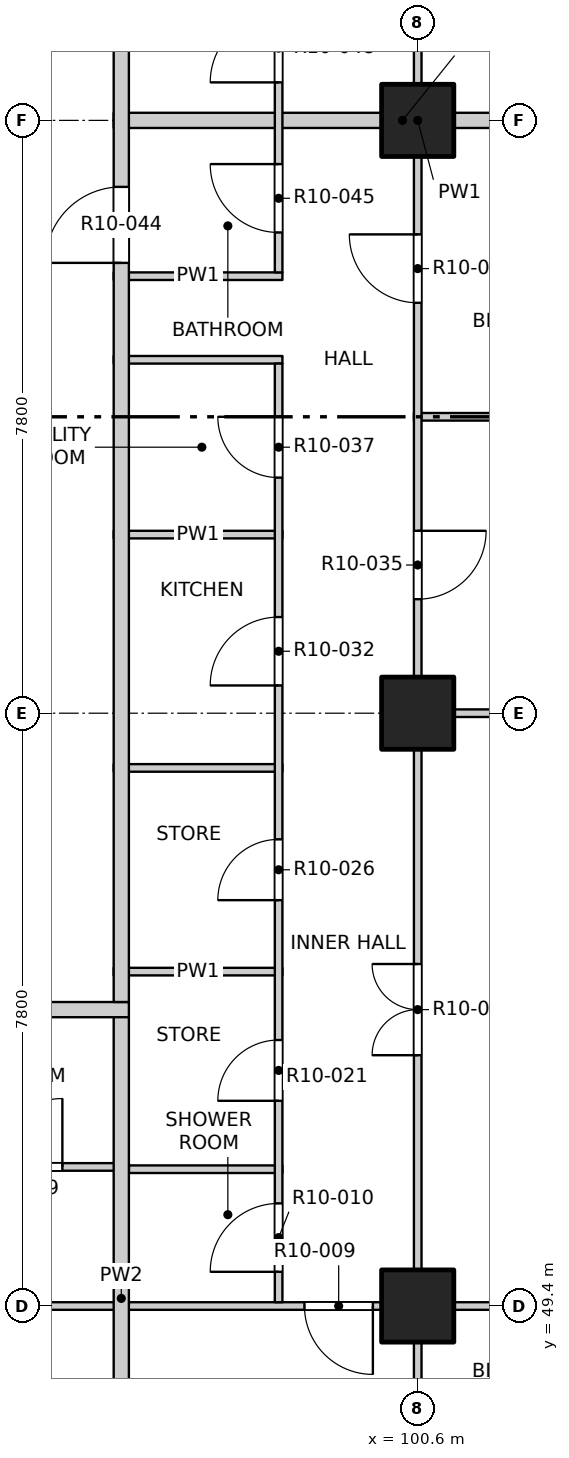
"""IFC4 building model, lengths in metres.
Left out: names, types, materials, properties, quantities, classifications, styles, units other than length and angle.
Written with IfcOpenShell. Run it as: python <this file> out.ifc"""

import sys

from ifc_helpers import new_model, si_unit, direction, frame, frame_2d, origin, origin_2d, place, context, subcontext, project, spatial, rectangle, extrude, element, fill, save


model = new_model("IFC4")
c1 = context("Model", 3, precision=1e-05, world=origin(), true_north=direction((0.0, 1.0)))
c2 = subcontext(c1, "Body", "Model", "MODEL_VIEW")
j1 = project(units=[si_unit("LENGTHUNIT", "METRE"), si_unit("PLANEANGLEUNIT", "RADIAN")], contexts=[c1])
p1 = place(None, origin())
s1 = spatial("IfcSite", under=j1, at=p1, CompositionType="ELEMENT")
p2 = place(p1, origin())
s2 = spatial("IfcBuilding", under=s1, at=p2, CompositionType="ELEMENT")
p3 = place(p2, frame((0.0, 0.0, 127.1)))
s3 = spatial("IfcBuildingStorey", under=s2, at=p3, CompositionType="ELEMENT", Elevation=127.1)
for number, where, z_axis, x_axis in (
    (1, (100.6, 49.4, -0.25), (0.0, 0.0, 1.0), (1.0, 0.0, 0.0)),
    (2, (100.6, 57.2, -0.25), (0.0, 0.0, 1.0), (1.0, 0.0, 0.0)),
    (3, (100.6, 65.0, -0.25), (0.0, 0.0, 1.0), (1.0, 0.0, 0.0)),
):
    element("IfcColumn", number, at=place(p3, frame(where, z_axis=z_axis, x_axis=x_axis)), inside=s3, PredefinedType="COLUMN", context=c2, shape_type="SweptSolid", body=[
        extrude(rectangle(XDim=0.95, YDim=0.95, at=origin_2d()), origin(), (0.0, 0.0, 1.0), 3.4),
    ])
p4 = place(p3, frame((65.8, 49.4, 0.0), z_axis=(0.0, 0.0, 1.0), x_axis=(1.0, 0.0, 0.0)))
e4 = element("IfcWall", 4, at=p4, inside=s3, PredefinedType="PARTITIONING", context=c2, shape_type="SweptSolid", body=[
    extrude(rectangle(XDim=38.4, YDim=0.1, at=frame_2d((19.2, 0.0))), origin(), (0.0, 0.0, 1.0), 3.15),
])
p5 = place(p4, frame((4.19, 0.0, 0.0)))
e5 = element("IfcOpeningElement", 5, at=p5, cuts=e4, PredefinedType="OPENING", context=c2, shape_type="SweptSolid", body=[
    extrude(rectangle(XDim=0.9, YDim=2.1, at=frame_2d((0.45, 1.05))), frame((0.0, 0.06, 0.0), z_axis=(0.0, -1.0, 0.0), x_axis=(1.0, 0.0, 0.0)), (0.0, 0.0, 1.0), 0.12),
])
p6 = place(p4, frame((9.0, 0.0, 0.0)))
e6 = element("IfcOpeningElement", 6, at=p6, cuts=e4, PredefinedType="OPENING", context=c2, shape_type="SweptSolid", body=[
    extrude(rectangle(XDim=0.9, YDim=2.1, at=frame_2d((0.45, 1.05))), frame((0.0, 0.06, 0.0), z_axis=(0.0, -1.0, 0.0), x_axis=(1.0, 0.0, 0.0)), (0.0, 0.0, 1.0), 0.12),
])
p7 = place(p4, frame((12.9, 0.0, 0.0)))
e7 = element("IfcOpeningElement", 7, at=p7, cuts=e4, PredefinedType="OPENING", context=c2, shape_type="SweptSolid", body=[
    extrude(rectangle(XDim=0.9, YDim=2.1, at=frame_2d((0.45, 1.05))), frame((0.0, 0.06, 0.0), z_axis=(0.0, -1.0, 0.0), x_axis=(1.0, 0.0, 0.0)), (0.0, 0.0, 1.0), 0.12),
])
p8 = place(p4, frame((16.8, 0.0, 0.0)))
e8 = element("IfcOpeningElement", 8, at=p8, cuts=e4, PredefinedType="OPENING", context=c2, shape_type="SweptSolid", body=[
    extrude(rectangle(XDim=0.9, YDim=2.1, at=frame_2d((0.45, 1.05))), frame((0.0, 0.06, 0.0), z_axis=(0.0, -1.0, 0.0), x_axis=(1.0, 0.0, 0.0)), (0.0, 0.0, 1.0), 0.12),
])
p9 = place(p4, frame((22.5, 0.0, 0.0)))
e9 = element("IfcOpeningElement", 9, at=p9, cuts=e4, PredefinedType="OPENING", context=c2, shape_type="SweptSolid", body=[
    extrude(rectangle(XDim=1.2, YDim=2.1, at=frame_2d((0.6, 1.05))), frame((0.0, 0.06, 0.0), z_axis=(0.0, -1.0, 0.0), x_axis=(1.0, 0.0, 0.0)), (0.0, 0.0, 1.0), 0.12),
])
p10 = place(p4, frame((28.5, 0.0, 0.0)))
e10 = element("IfcOpeningElement", 10, at=p10, cuts=e4, PredefinedType="OPENING", context=c2, shape_type="SweptSolid", body=[
    extrude(rectangle(XDim=0.9, YDim=2.1, at=frame_2d((0.45, 1.05))), frame((0.0, 0.06, 0.0), z_axis=(0.0, -1.0, 0.0), x_axis=(1.0, 0.0, 0.0)), (0.0, 0.0, 1.0), 0.12),
])
p11 = place(p4, frame((33.31, 0.0, 0.0)))
e11 = element("IfcOpeningElement", 11, at=p11, cuts=e4, PredefinedType="OPENING", context=c2, shape_type="SweptSolid", body=[
    extrude(rectangle(XDim=0.9, YDim=2.1, at=frame_2d((0.45, 1.05))), frame((0.0, 0.06, 0.0), z_axis=(0.0, -1.0, 0.0), x_axis=(1.0, 0.0, 0.0)), (0.0, 0.0, 1.0), 0.12),
])
p12 = place(p3, frame((96.8, 51.2, 0.0), z_axis=(0.0, 0.0, 1.0), x_axis=(1.0, 0.0, 0.0)))
e12 = element("IfcWall", 12, at=p12, inside=s3, PredefinedType="PARTITIONING", context=c2, shape_type="SweptSolid", body=[
    extrude(rectangle(XDim=2.02, YDim=0.1, at=frame_2d((1.01, 0.0))), origin(), (0.0, 0.0, 1.0), 3.15),
])
p13 = place(p3, frame((91.75, 51.23, 0.0), z_axis=(0.0, 0.0, 1.0), x_axis=(1.0, 0.0, 0.0)))
e13 = element("IfcWall", 13, at=p13, inside=s3, PredefinedType="PARTITIONING", context=c2, shape_type="SweptSolid", body=[
    extrude(rectangle(XDim=5.05, YDim=0.1, at=frame_2d((2.525, 0.0))), origin(), (0.0, 0.0, 1.0), 3.15),
])
p14 = place(p13, frame((0.875, 0.0, 0.0)))
e14 = element("IfcOpeningElement", 14, at=p14, cuts=e13, PredefinedType="OPENING", context=c2, shape_type="SweptSolid", body=[
    extrude(rectangle(XDim=0.8, YDim=2.1, at=frame_2d((0.4, 1.05))), frame((0.0, 0.06, 0.0), z_axis=(0.0, -1.0, 0.0), x_axis=(1.0, 0.0, 0.0)), (0.0, 0.0, 1.0), 0.12),
])
p15 = place(p13, frame((3.275, 0.0, 0.0)))
e15 = element("IfcOpeningElement", 15, at=p15, cuts=e13, PredefinedType="OPENING", context=c2, shape_type="SweptSolid", body=[
    extrude(rectangle(XDim=0.9, YDim=2.1, at=frame_2d((0.45, 1.05))), frame((0.0, 0.06, 0.0), z_axis=(0.0, -1.0, 0.0), x_axis=(1.0, 0.0, 0.0)), (0.0, 0.0, 1.0), 0.12),
])
p16 = place(p3, frame((73.2, 53.3, 0.0), z_axis=(0.0, 0.0, 1.0), x_axis=(1.0, 0.0, 0.0)))
e16 = element("IfcWall", 16, at=p16, inside=s3, PredefinedType="PARTITIONING", context=c2, shape_type="SweptSolid", body=[
    extrude(rectangle(XDim=23.6, YDim=0.2, at=frame_2d((11.8, 0.0))), origin(), (0.0, 0.0, 1.0), 3.15),
])
p17 = place(p16, frame((6.175, 0.0, 0.0)))
e17 = element("IfcOpeningElement", 17, at=p17, cuts=e16, PredefinedType="OPENING", context=c2, shape_type="SweptSolid", body=[
    extrude(rectangle(XDim=1.0, YDim=2.1, at=frame_2d((0.5, 1.05))), frame((0.0, 0.11, 0.0), z_axis=(0.0, -1.0, 0.0), x_axis=(1.0, 0.0, 0.0)), (0.0, 0.0, 1.0), 0.22),
])
p18 = place(p16, frame((18.775, 0.0, 0.0)))
e18 = element("IfcOpeningElement", 18, at=p18, cuts=e16, PredefinedType="OPENING", context=c2, shape_type="SweptSolid", body=[
    extrude(rectangle(XDim=1.0, YDim=2.1, at=frame_2d((0.5, 1.05))), frame((0.0, 0.11, 0.0), z_axis=(0.0, -1.0, 0.0), x_axis=(1.0, 0.0, 0.0)), (0.0, 0.0, 1.0), 0.22),
])
for number, where, z_axis, x_axis in (
    (19, (96.6, 53.8, 0.0), (0.0, 0.0, 1.0), (1.0, 0.0, 0.0)),
    (20, (96.6, 56.48, 0.0), (0.0, 0.0, 1.0), (1.0, 0.0, 0.0)),
):
    element("IfcWall", number, at=place(p3, frame(where, z_axis=z_axis, x_axis=x_axis)), inside=s3, PredefinedType="PARTITIONING", context=c2, shape_type="SweptSolid", body=[
        extrude(rectangle(XDim=2.22, YDim=0.1, at=frame_2d((1.11, 0.0))), origin(), (0.0, 0.0, 1.0), 3.15),
    ])
p19 = place(p3, frame((100.55, 57.2, 0.0), z_axis=(0.0, 0.0, 1.0), x_axis=(1.0, 0.0, 0.0)))
e21 = element("IfcWall", 21, at=p19, inside=s3, PredefinedType="PARTITIONING", context=c2, shape_type="SweptSolid", body=[
    extrude(rectangle(XDim=3.65, YDim=0.1, at=frame_2d((1.825, 0.0))), origin(), (0.0, 0.0, 1.0), 3.15),
])
p20 = place(p3, frame((96.6, 59.55, 0.0), z_axis=(0.0, 0.0, 1.0), x_axis=(1.0, 0.0, 0.0)))
e22 = element("IfcWall", 22, at=p20, inside=s3, PredefinedType="PARTITIONING", context=c2, shape_type="SweptSolid", body=[
    extrude(rectangle(XDim=2.22, YDim=0.1, at=frame_2d((1.11, 0.0))), origin(), (0.0, 0.0, 1.0), 3.15),
])
p21 = place(p3, frame((100.55, 61.1, 0.0), z_axis=(0.0, 0.0, 1.0), x_axis=(1.0, 0.0, 0.0)))
e23 = element("IfcWall", 23, at=p21, inside=s3, PredefinedType="PARTITIONING", context=c2, shape_type="SweptSolid", body=[
    extrude(rectangle(XDim=3.65, YDim=0.1, at=frame_2d((1.825, 0.0))), origin(), (0.0, 0.0, 1.0), 2.55),
])
for number, where, z_axis, x_axis in (
    (24, (96.6, 61.85, 0.0), (0.0, 0.0, 1.0), (1.0, 0.0, 0.0)),
    (25, (96.6, 62.95, 0.0), (0.0, 0.0, 1.0), (1.0, 0.0, 0.0)),
):
    element("IfcWall", number, at=place(p3, frame(where, z_axis=z_axis, x_axis=x_axis)), inside=s3, PredefinedType="PARTITIONING", context=c2, shape_type="SweptSolid", body=[
        extrude(rectangle(XDim=2.22, YDim=0.1, at=frame_2d((1.11, 0.0))), origin(), (0.0, 0.0, 1.0), 3.15),
    ])
p22 = place(p3, frame((96.6, 65.0, 0.0), z_axis=(0.0, 0.0, 1.0), x_axis=(1.0, 0.0, 0.0)))
e26 = element("IfcWall", 26, at=p22, inside=s3, PredefinedType="PARTITIONING", context=c2, shape_type="SweptSolid", body=[
    extrude(rectangle(XDim=7.6, YDim=0.2, at=frame_2d((3.8, 0.0))), origin(), (0.0, 0.0, 1.0), 3.15),
])
p23 = place(p3, frame((96.7, 45.8, 0.0), z_axis=(0.0, 0.0, 1.0), x_axis=(0.0, 1.0, 0.0)))
e27 = element("IfcWall", 27, at=p23, inside=s3, PredefinedType="PARTITIONING", context=c2, shape_type="SweptSolid", body=[
    extrude(rectangle(XDim=7.4, YDim=0.2, at=frame_2d((3.7, 0.0))), origin(), (0.0, 0.0, 1.0), 3.15),
])
p24 = place(p3, frame((96.7, 53.4, 0.0), z_axis=(0.0, 0.0, 1.0), x_axis=(0.0, 1.0, 0.0)))
e28 = element("IfcWall", 28, at=p24, inside=s3, PredefinedType="PARTITIONING", context=c2, shape_type="SweptSolid", body=[
    extrude(rectangle(XDim=30.8, YDim=0.2, at=frame_2d((15.4, 0.0))), origin(), (0.0, 0.0, 1.0), 3.15),
])
p25 = place(p24, frame((9.725, 0.0, 0.0)))
e29 = element("IfcOpeningElement", 29, at=p25, cuts=e28, PredefinedType="OPENING", context=c2, shape_type="SweptSolid", body=[
    extrude(rectangle(XDim=1.0, YDim=2.1, at=frame_2d((0.5, 1.05))), frame((0.0, 0.11, 0.0), z_axis=(0.0, -1.0, 0.0), x_axis=(1.0, 0.0, 0.0)), (0.0, 0.0, 1.0), 0.22),
])
p26 = place(p24, frame((14.775, 0.0, 0.0)))
e30 = element("IfcOpeningElement", 30, at=p26, cuts=e28, PredefinedType="OPENING", context=c2, shape_type="SweptSolid", body=[
    extrude(rectangle(XDim=1.0, YDim=2.1, at=frame_2d((0.5, 1.05))), frame((0.0, 0.11, 0.0), z_axis=(0.0, -1.0, 0.0), x_axis=(1.0, 0.0, 0.0)), (0.0, 0.0, 1.0), 0.22),
])
p27 = place(p3, frame((98.77, 49.45, 0.0), z_axis=(0.0, 0.0, 1.0), x_axis=(0.0, 1.0, 0.0)))
e31 = element("IfcWall", 31, at=p27, inside=s3, PredefinedType="PARTITIONING", context=c2, shape_type="SweptSolid", body=[
    extrude(rectangle(XDim=12.35, YDim=0.1, at=frame_2d((6.175, 0.0))), origin(), (0.0, 0.0, 1.0), 3.15),
])
p28 = place(p27, frame((0.4, 0.0, 0.0)))
e32 = element("IfcOpeningElement", 32, at=p28, cuts=e31, PredefinedType="OPENING", context=c2, shape_type="SweptSolid", body=[
    extrude(rectangle(XDim=0.9, YDim=2.1, at=frame_2d((0.45, 1.05))), frame((0.0, 0.06, 0.0), z_axis=(0.0, -1.0, 0.0), x_axis=(1.0, 0.0, 0.0)), (0.0, 0.0, 1.0), 0.12),
])
p29 = place(p27, frame((2.65, 0.0, 0.0)))
e33 = element("IfcOpeningElement", 33, at=p29, cuts=e31, PredefinedType="OPENING", context=c2, shape_type="SweptSolid", body=[
    extrude(rectangle(XDim=0.8, YDim=2.1, at=frame_2d((0.4, 1.05))), frame((0.0, 0.06, 0.0), z_axis=(0.0, -1.0, 0.0), x_axis=(1.0, 0.0, 0.0)), (0.0, 0.0, 1.0), 0.12),
])
p30 = place(p27, frame((5.29, 0.0, 0.0)))
e34 = element("IfcOpeningElement", 34, at=p30, cuts=e31, PredefinedType="OPENING", context=c2, shape_type="SweptSolid", body=[
    extrude(rectangle(XDim=0.8, YDim=2.1, at=frame_2d((0.4, 1.05))), frame((0.0, 0.06, 0.0), z_axis=(0.0, -1.0, 0.0), x_axis=(1.0, 0.0, 0.0)), (0.0, 0.0, 1.0), 0.12),
])
p31 = place(p27, frame((8.115, 0.0, 0.0)))
e35 = element("IfcOpeningElement", 35, at=p31, cuts=e31, PredefinedType="OPENING", context=c2, shape_type="SweptSolid", body=[
    extrude(rectangle(XDim=0.9, YDim=2.1, at=frame_2d((0.45, 1.05))), frame((0.0, 0.06, 0.0), z_axis=(0.0, -1.0, 0.0), x_axis=(1.0, 0.0, 0.0)), (0.0, 0.0, 1.0), 0.12),
])
p32 = place(p27, frame((10.85, 0.0, 0.0)))
e36 = element("IfcOpeningElement", 36, at=p32, cuts=e31, PredefinedType="OPENING", context=c2, shape_type="SweptSolid", body=[
    extrude(rectangle(XDim=0.8, YDim=2.1, at=frame_2d((0.4, 1.05))), frame((0.0, 0.06, 0.0), z_axis=(0.0, -1.0, 0.0), x_axis=(1.0, 0.0, 0.0)), (0.0, 0.0, 1.0), 0.12),
])
p33 = place(p3, frame((98.77, 63.0, 0.0), z_axis=(0.0, 0.0, 1.0), x_axis=(0.0, 1.0, 0.0)))
e37 = element("IfcWall", 37, at=p33, inside=s3, PredefinedType="PARTITIONING", context=c2, shape_type="SweptSolid", body=[
    extrude(rectangle(XDim=3.85, YDim=0.1, at=frame_2d((1.925, 0.0))), origin(), (0.0, 0.0, 1.0), 3.15),
])
p34 = place(p33, frame((0.525, 0.0, 0.0)))
e38 = element("IfcOpeningElement", 38, at=p34, cuts=e37, PredefinedType="OPENING", context=c2, shape_type="SweptSolid", body=[
    extrude(rectangle(XDim=0.9, YDim=2.1, at=frame_2d((0.45, 1.05))), frame((0.0, 0.06, 0.0), z_axis=(0.0, -1.0, 0.0), x_axis=(1.0, 0.0, 0.0)), (0.0, 0.0, 1.0), 0.12),
])
p35 = place(p33, frame((2.5, 0.0, 0.0)))
e39 = element("IfcOpeningElement", 39, at=p35, cuts=e37, PredefinedType="OPENING", context=c2, shape_type="SweptSolid", body=[
    extrude(rectangle(XDim=0.9, YDim=2.1, at=frame_2d((0.45, 1.05))), frame((0.0, 0.06, 0.0), z_axis=(0.0, -1.0, 0.0), x_axis=(1.0, 0.0, 0.0)), (0.0, 0.0, 1.0), 0.12),
])
p36 = place(p3, frame((100.6, 45.8, 0.0), z_axis=(0.0, 0.0, 1.0), x_axis=(0.0, 1.0, 0.0)))
e40 = element("IfcWall", 40, at=p36, inside=s3, PredefinedType="PARTITIONING", context=c2, shape_type="SweptSolid", body=[
    extrude(rectangle(XDim=38.4, YDim=0.1, at=frame_2d((19.2, 0.0))), origin(), (0.0, 0.0, 1.0), 3.15),
])
p37 = place(p36, frame((1.05, 0.0, 0.0)))
e41 = element("IfcOpeningElement", 41, at=p37, cuts=e40, PredefinedType="OPENING", context=c2, shape_type="SweptSolid", body=[
    extrude(rectangle(XDim=1.2, YDim=2.1, at=frame_2d((0.6, 1.05))), frame((0.0, 0.06, 0.0), z_axis=(0.0, -1.0, 0.0), x_axis=(1.0, 0.0, 0.0)), (0.0, 0.0, 1.0), 0.12),
])
p38 = place(p36, frame((6.9, 0.0, 0.0)))
e42 = element("IfcOpeningElement", 42, at=p38, cuts=e40, PredefinedType="OPENING", context=c2, shape_type="SweptSolid", body=[
    extrude(rectangle(XDim=1.2, YDim=2.1, at=frame_2d((0.6, 1.05))), frame((0.0, 0.06, 0.0), z_axis=(0.0, -1.0, 0.0), x_axis=(1.0, 0.0, 0.0)), (0.0, 0.0, 1.0), 0.12),
])
p39 = place(p36, frame((12.9, 0.0, 0.0)))
e43 = element("IfcOpeningElement", 43, at=p39, cuts=e40, PredefinedType="OPENING", context=c2, shape_type="SweptSolid", body=[
    extrude(rectangle(XDim=0.9, YDim=2.1, at=frame_2d((0.45, 1.05))), frame((0.0, 0.06, 0.0), z_axis=(0.0, -1.0, 0.0), x_axis=(1.0, 0.0, 0.0)), (0.0, 0.0, 1.0), 0.12),
])
p40 = place(p36, frame((16.8, 0.0, 0.0)))
e44 = element("IfcOpeningElement", 44, at=p40, cuts=e40, PredefinedType="OPENING", context=c2, shape_type="SweptSolid", body=[
    extrude(rectangle(XDim=0.9, YDim=2.1, at=frame_2d((0.45, 1.05))), frame((0.0, 0.06, 0.0), z_axis=(0.0, -1.0, 0.0), x_axis=(1.0, 0.0, 0.0)), (0.0, 0.0, 1.0), 0.12),
])
p41 = place(p36, frame((20.7, 0.0, 0.0)))
e45 = element("IfcOpeningElement", 45, at=p41, cuts=e40, PredefinedType="OPENING", context=c2, shape_type="SweptSolid", body=[
    extrude(rectangle(XDim=0.9, YDim=2.1, at=frame_2d((0.45, 1.05))), frame((0.0, 0.06, 0.0), z_axis=(0.0, -1.0, 0.0), x_axis=(1.0, 0.0, 0.0)), (0.0, 0.0, 1.0), 0.12),
])
p42 = place(p36, frame((27.575, 0.0, 0.0)))
e46 = element("IfcOpeningElement", 46, at=p42, cuts=e40, PredefinedType="OPENING", context=c2, shape_type="SweptSolid", body=[
    extrude(rectangle(XDim=1.2, YDim=2.1, at=frame_2d((0.6, 1.05))), frame((0.0, 0.06, 0.0), z_axis=(0.0, -1.0, 0.0), x_axis=(1.0, 0.0, 0.0)), (0.0, 0.0, 1.0), 0.12),
])
p43 = place(p36, frame((32.4, 0.0, 0.0)))
e47 = element("IfcOpeningElement", 47, at=p43, cuts=e40, PredefinedType="OPENING", context=c2, shape_type="SweptSolid", body=[
    extrude(rectangle(XDim=0.9, YDim=2.1, at=frame_2d((0.45, 1.05))), frame((0.0, 0.06, 0.0), z_axis=(0.0, -1.0, 0.0), x_axis=(1.0, 0.0, 0.0)), (0.0, 0.0, 1.0), 0.12),
])
p44 = place(p36, frame((36.15, 0.0, 0.0)))
e48 = element("IfcOpeningElement", 48, at=p44, cuts=e40, PredefinedType="OPENING", context=c2, shape_type="SweptSolid", body=[
    extrude(rectangle(XDim=1.2, YDim=2.1, at=frame_2d((0.6, 1.05))), frame((0.0, 0.06, 0.0), z_axis=(0.0, -1.0, 0.0), x_axis=(1.0, 0.0, 0.0)), (0.0, 0.0, 1.0), 0.12),
])
p45 = place(p11, origin())
e49 = element("IfcDoor", 49, at=p45, inside=s3, OperationType="SINGLE_SWING_LEFT", PredefinedType="DOOR", context=c2, shape_type="SweptSolid", body=[
    extrude(rectangle(XDim=0.9, YDim=2.1, at=frame_2d((0.45, 1.05))), frame((0.0, 0.025, 0.0), z_axis=(0.0, -1.0, 0.0), x_axis=(1.0, 0.0, 0.0)), (0.0, 0.0, 1.0), 0.05),
])
fill(e11, e49)
p46 = place(p28, origin())
e50 = element("IfcDoor", 50, at=p46, inside=s3, OperationType="SINGLE_SWING_LEFT", PredefinedType="DOOR", context=c2, shape_type="SweptSolid", body=[
    extrude(rectangle(XDim=0.9, YDim=2.1, at=frame_2d((0.45, 1.05))), frame((0.0, 0.025, 0.0), z_axis=(0.0, -1.0, 0.0), x_axis=(1.0, 0.0, 0.0)), (0.0, 0.0, 1.0), 0.05),
])
fill(e32, e50)
p47 = place(p15, origin())
e51 = element("IfcDoor", 51, at=p47, inside=s3, OperationType="SINGLE_SWING_RIGHT", PredefinedType="DOOR", context=c2, shape_type="SweptSolid", body=[
    extrude(rectangle(XDim=0.9, YDim=2.1, at=frame_2d((0.45, 1.05))), frame((0.0, 0.025, 0.0), z_axis=(0.0, -1.0, 0.0), x_axis=(1.0, 0.0, 0.0)), (0.0, 0.0, 1.0), 0.05),
])
fill(e15, e51)
p48 = place(p29, origin())
e52 = element("IfcDoor", 52, at=p48, inside=s3, OperationType="SINGLE_SWING_LEFT", PredefinedType="DOOR", context=c2, shape_type="SweptSolid", body=[
    extrude(rectangle(XDim=0.8, YDim=2.1, at=frame_2d((0.4, 1.05))), frame((0.0, 0.025, 0.0), z_axis=(0.0, -1.0, 0.0), x_axis=(1.0, 0.0, 0.0)), (0.0, 0.0, 1.0), 0.05),
])
fill(e33, e52)
p49 = place(p38, origin())
e53 = element("IfcDoor", 53, at=p49, inside=s3, OperationType="DOUBLE_DOOR_SINGLE_SWING", PredefinedType="DOOR", context=c2, shape_type="SweptSolid", body=[
    extrude(rectangle(XDim=1.2, YDim=2.1, at=frame_2d((0.6, 1.05))), frame((0.0, 0.025, 0.0), z_axis=(0.0, -1.0, 0.0), x_axis=(1.0, 0.0, 0.0)), (0.0, 0.0, 1.0), 0.05),
])
fill(e42, e53)
p50 = place(p30, origin())
e54 = element("IfcDoor", 54, at=p50, inside=s3, OperationType="SINGLE_SWING_LEFT", PredefinedType="DOOR", context=c2, shape_type="SweptSolid", body=[
    extrude(rectangle(XDim=0.8, YDim=2.1, at=frame_2d((0.4, 1.05))), frame((0.0, 0.025, 0.0), z_axis=(0.0, -1.0, 0.0), x_axis=(1.0, 0.0, 0.0)), (0.0, 0.0, 1.0), 0.05),
])
fill(e34, e54)
p51 = place(p31, origin())
e55 = element("IfcDoor", 55, at=p51, inside=s3, OperationType="SINGLE_SWING_LEFT", PredefinedType="DOOR", context=c2, shape_type="SweptSolid", body=[
    extrude(rectangle(XDim=0.9, YDim=2.1, at=frame_2d((0.45, 1.05))), frame((0.0, 0.025, 0.0), z_axis=(0.0, -1.0, 0.0), x_axis=(1.0, 0.0, 0.0)), (0.0, 0.0, 1.0), 0.05),
])
fill(e35, e55)
p52 = place(p39, origin())
e56 = element("IfcDoor", 56, at=p52, inside=s3, OperationType="SINGLE_SWING_LEFT", PredefinedType="DOOR", context=c2, shape_type="SweptSolid", body=[
    extrude(rectangle(XDim=0.9, YDim=2.1, at=frame_2d((0.45, 1.05))), frame((0.0, 0.025, 0.0), z_axis=(0.0, -1.0, 0.0), x_axis=(1.0, 0.0, 0.0)), (0.0, 0.0, 1.0), 0.05),
])
fill(e43, e56)
p53 = place(p32, origin())
e57 = element("IfcDoor", 57, at=p53, inside=s3, OperationType="SINGLE_SWING_RIGHT", PredefinedType="DOOR", context=c2, shape_type="SweptSolid", body=[
    extrude(rectangle(XDim=0.8, YDim=2.1, at=frame_2d((0.4, 1.05))), frame((0.0, 0.025, 0.0), z_axis=(0.0, -1.0, 0.0), x_axis=(1.0, 0.0, 0.0)), (0.0, 0.0, 1.0), 0.05),
])
fill(e36, e57)
p54 = place(p40, origin())
e58 = element("IfcDoor", 58, at=p54, inside=s3, OperationType="SINGLE_SWING_RIGHT", PredefinedType="DOOR", context=c2, shape_type="SweptSolid", body=[
    extrude(rectangle(XDim=0.9, YDim=2.1, at=frame_2d((0.45, 1.05))), frame((0.0, 0.025, 0.0), z_axis=(0.0, -1.0, 0.0), x_axis=(1.0, 0.0, 0.0)), (0.0, 0.0, 1.0), 0.05),
])
fill(e44, e58)
p55 = place(p25, origin())
e59 = element("IfcDoor", 59, at=p55, inside=s3, OperationType="SINGLE_SWING_LEFT", PredefinedType="DOOR", context=c2, shape_type="SweptSolid", body=[
    extrude(rectangle(XDim=1.0, YDim=2.1, at=frame_2d((0.5, 1.05))), frame((0.0, 0.025, 0.0), z_axis=(0.0, -1.0, 0.0), x_axis=(1.0, 0.0, 0.0)), (0.0, 0.0, 1.0), 0.05),
])
fill(e29, e59)
p56 = place(p34, origin())
e60 = element("IfcDoor", 60, at=p56, inside=s3, OperationType="SINGLE_SWING_RIGHT", PredefinedType="DOOR", context=c2, shape_type="SweptSolid", body=[
    extrude(rectangle(XDim=0.9, YDim=2.1, at=frame_2d((0.45, 1.05))), frame((0.0, 0.025, 0.0), z_axis=(0.0, -1.0, 0.0), x_axis=(1.0, 0.0, 0.0)), (0.0, 0.0, 1.0), 0.05),
])
fill(e38, e60)
p57 = place(p35, origin())
e61 = element("IfcDoor", 61, at=p57, inside=s3, OperationType="SINGLE_SWING_LEFT", PredefinedType="DOOR", context=c2, shape_type="SweptSolid", body=[
    extrude(rectangle(XDim=0.9, YDim=2.1, at=frame_2d((0.45, 1.05))), frame((0.0, 0.025, 0.0), z_axis=(0.0, -1.0, 0.0), x_axis=(1.0, 0.0, 0.0)), (0.0, 0.0, 1.0), 0.05),
])
fill(e39, e61)
save(model, sys.argv[1])
